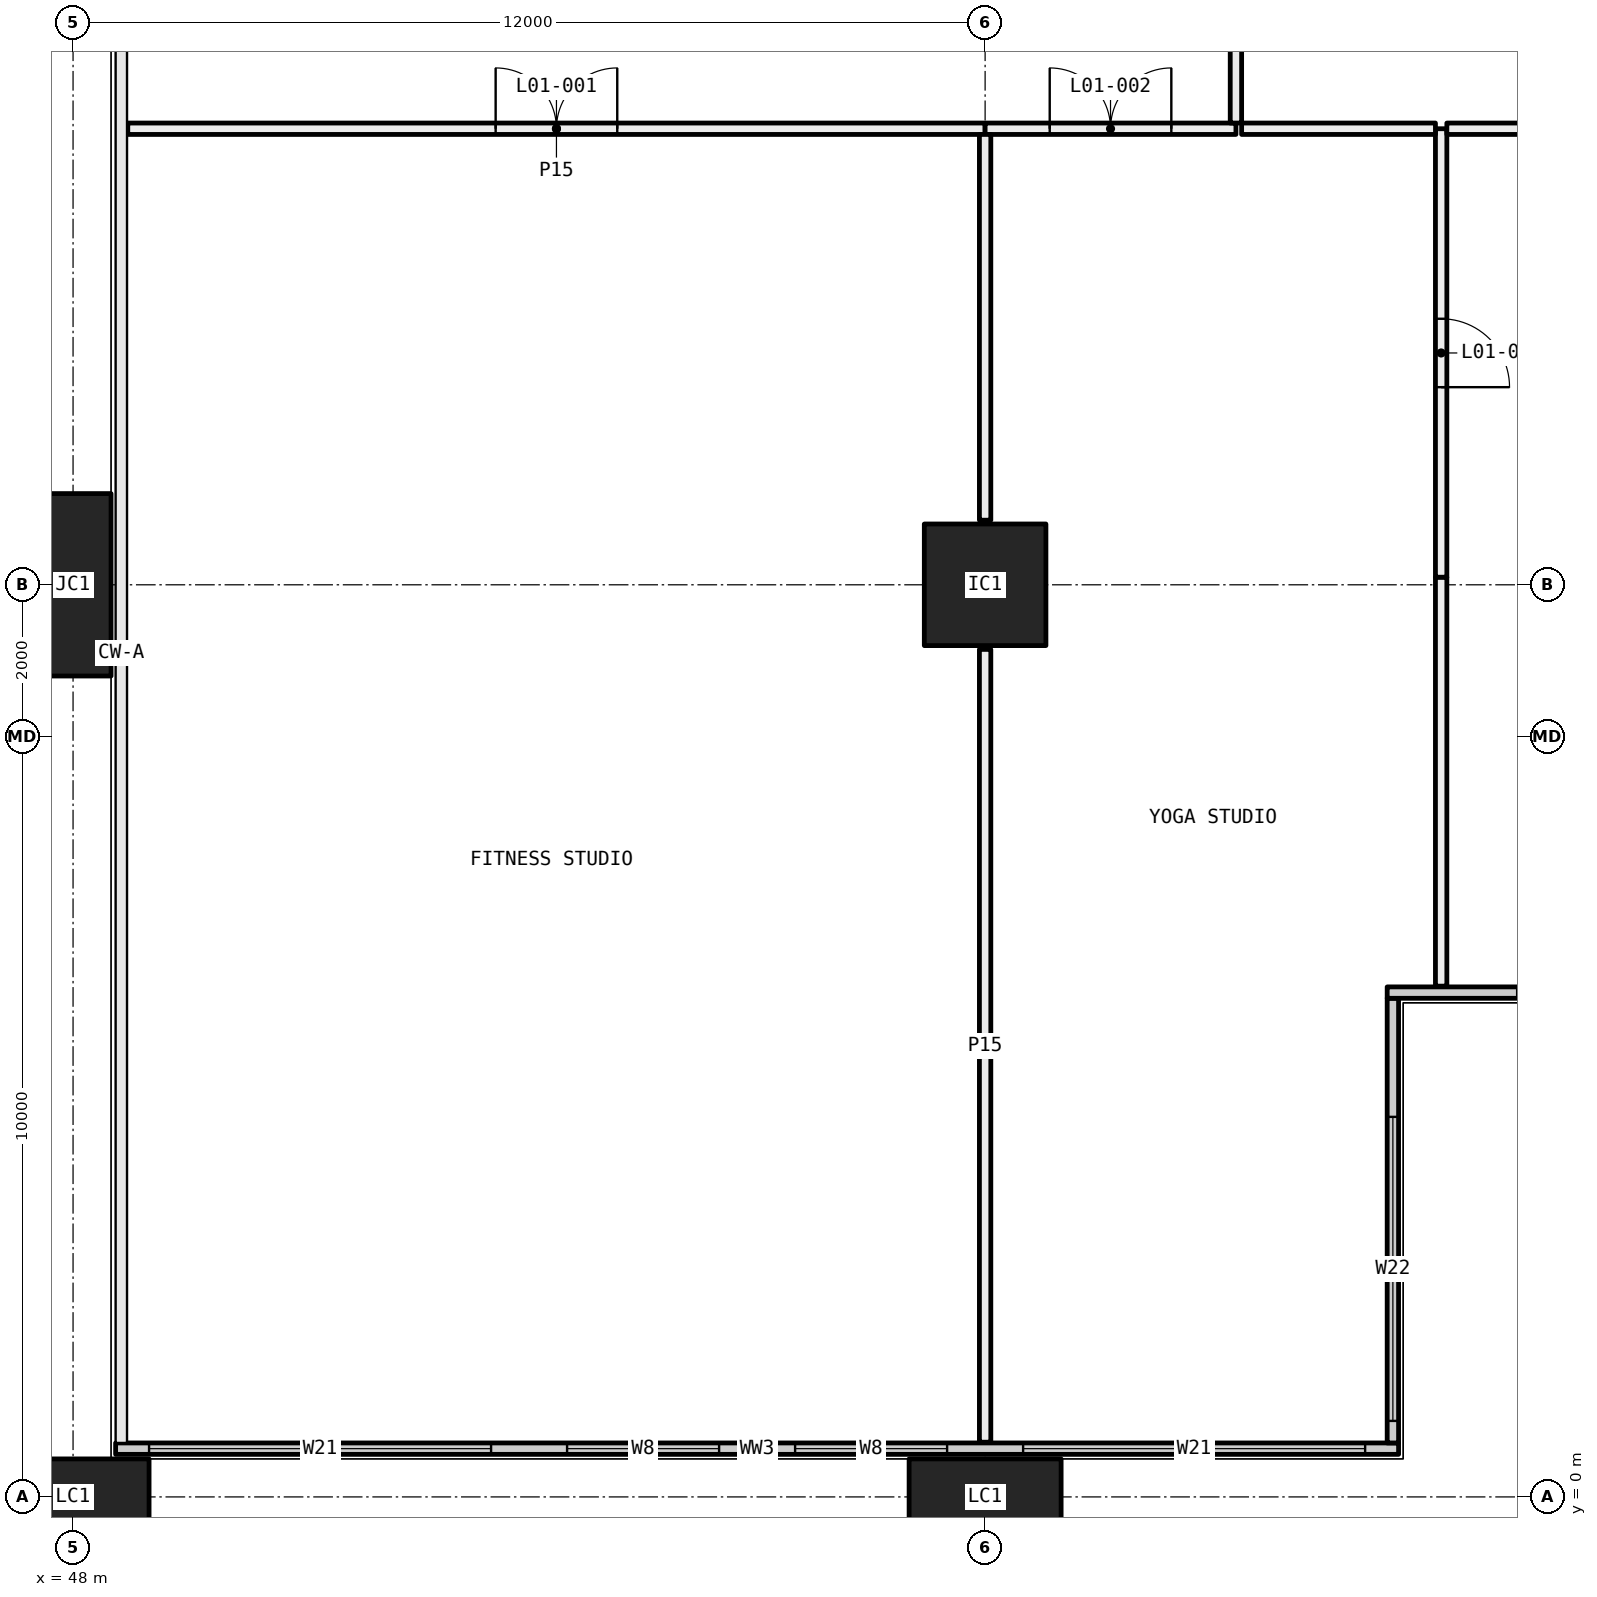
"""IFC4 building model, lengths in metres.
Left out: names, types, materials, properties, quantities, classifications, styles, units other than length and angle.
Written with IfcOpenShell. Run it as: python <this file> out.ifc"""

import sys

from ifc_helpers import new_model, si_unit, direction, frame, frame_2d, origin, origin_2d, place, context, subcontext, project, spatial, rectangle, hollow_rectangle, extrude, element, fill, save


model = new_model("IFC4")
c1 = context("Model", 3, precision=1e-05, world=origin(), true_north=direction((0.0, 1.0)))
c2 = subcontext(c1, "Body", "Model", "MODEL_VIEW")
j1 = project(units=[si_unit("LENGTHUNIT", "METRE"), si_unit("PLANEANGLEUNIT", "RADIAN")], contexts=[c1])
p1 = place(None, origin())
s1 = spatial("IfcSite", under=j1, at=p1, CompositionType="ELEMENT")
p2 = place(p1, origin())
s2 = spatial("IfcBuilding", under=s1, at=p2, CompositionType="ELEMENT")
p3 = place(p2, frame((0.0, 0.0, 6.0)))
s3 = spatial("IfcBuildingStorey", under=s2, at=p3, CompositionType="ELEMENT", Elevation=6.0)
p4 = place(p3, frame((48.0, 0.0, -0.4), z_axis=(0.0, 0.0, 1.0), x_axis=(1.0, 0.0, 0.0)))
e1 = element("IfcColumn", 1, at=p4, inside=s3, PredefinedType="COLUMN", context=c2, shape_type="SweptSolid", body=[
    extrude(hollow_rectangle(XDim=2.0, YDim=1.0, WallThickness=0.08, at=origin_2d()), origin(), (0.0, 0.0, 1.0), 6.0),
])
p5 = place(p3, frame((48.0, 12.0, -0.4), z_axis=(0.0, 0.0, 1.0), x_axis=(0.0, 1.0, 0.0)))
e2 = element("IfcColumn", 2, at=p5, inside=s3, PredefinedType="COLUMN", context=c2, shape_type="SweptSolid", body=[
    extrude(hollow_rectangle(XDim=2.4, YDim=1.0, WallThickness=0.09, at=origin_2d()), origin(), (0.0, 0.0, 1.0), 6.0),
])
p6 = place(p3, frame((60.0, 0.0, -0.4), z_axis=(0.0, 0.0, 1.0), x_axis=(1.0, 0.0, 0.0)))
e3 = element("IfcColumn", 3, at=p6, inside=s3, PredefinedType="COLUMN", context=c2, shape_type="SweptSolid", body=[
    extrude(hollow_rectangle(XDim=2.0, YDim=1.0, WallThickness=0.08, at=origin_2d()), origin(), (0.0, 0.0, 1.0), 6.0),
])
p7 = place(p3, frame((60.0, 12.0, 0.0), z_axis=(0.0, 0.0, 1.0), x_axis=(1.0, 0.0, 0.0)))
e4 = element("IfcColumn", 4, at=p7, inside=s3, PredefinedType="COLUMN", context=c2, shape_type="SweptSolid", body=[
    extrude(hollow_rectangle(XDim=1.6, YDim=1.6, WallThickness=0.07, at=origin_2d()), origin(), (0.0, 0.0, 1.0), 5.6),
])
p8 = place(p3, frame((48.56, 0.635, 0.0), z_axis=(0.0, 0.0, 1.0), x_axis=(1.0, 0.0, 0.0)))
e5 = element("IfcWall", 5, at=p8, inside=s3, PredefinedType="ELEMENTEDWALL", context=c2, shape_type="SweptSolid", body=[
    extrude(rectangle(XDim=16.88, YDim=0.15, at=frame_2d((8.44, 0.0))), origin(), (0.0, 0.0, 1.0), 5.6),
])
p9 = place(p8, frame((0.44, 0.0, 0.45)))
e6 = element("IfcOpeningElement", 6, at=p9, cuts=e5, PredefinedType="OPENING", context=c2, shape_type="SweptSolid", body=[
    extrude(rectangle(XDim=4.5, YDim=5.1, at=frame_2d((2.25, 2.55))), frame((0.0, 0.085, 0.0), z_axis=(0.0, -1.0, 0.0), x_axis=(1.0, 0.0, 0.0)), (0.0, 0.0, 1.0), 0.17),
])
p10 = place(p8, frame((5.94, 0.0, 0.45)))
e7 = element("IfcOpeningElement", 7, at=p10, cuts=e5, PredefinedType="OPENING", context=c2, shape_type="SweptSolid", body=[
    extrude(rectangle(XDim=2.0, YDim=5.1, at=frame_2d((1.0, 2.55))), frame((0.0, 0.085, 0.0), z_axis=(0.0, -1.0, 0.0), x_axis=(1.0, 0.0, 0.0)), (0.0, 0.0, 1.0), 0.17),
])
p11 = place(p8, frame((8.94, 0.0, 0.45)))
e8 = element("IfcOpeningElement", 8, at=p11, cuts=e5, PredefinedType="OPENING", context=c2, shape_type="SweptSolid", body=[
    extrude(rectangle(XDim=2.0, YDim=5.1, at=frame_2d((1.0, 2.55))), frame((0.0, 0.085, 0.0), z_axis=(0.0, -1.0, 0.0), x_axis=(1.0, 0.0, 0.0)), (0.0, 0.0, 1.0), 0.17),
])
p12 = place(p8, frame((11.94, 0.0, 0.45)))
e9 = element("IfcOpeningElement", 9, at=p12, cuts=e5, PredefinedType="OPENING", context=c2, shape_type="SweptSolid", body=[
    extrude(rectangle(XDim=4.5, YDim=5.1, at=frame_2d((2.25, 2.55))), frame((0.0, 0.085, 0.0), z_axis=(0.0, -1.0, 0.0), x_axis=(1.0, 0.0, 0.0)), (0.0, 0.0, 1.0), 0.17),
])
p13 = place(p3, frame((65.365, 0.71, 0.0), z_axis=(0.0, 0.0, 1.0), x_axis=(0.0, 1.0, 0.0)))
e10 = element("IfcWall", 10, at=p13, inside=s3, PredefinedType="ELEMENTEDWALL", context=c2, shape_type="SweptSolid", body=[
    extrude(rectangle(XDim=5.85, YDim=0.15, at=frame_2d((2.925, 0.0))), origin(), (0.0, 0.0, 1.0), 5.6),
])
p14 = place(p13, frame((0.29, 0.0, 0.45)))
e11 = element("IfcOpeningElement", 11, at=p14, cuts=e10, PredefinedType="OPENING", context=c2, shape_type="SweptSolid", body=[
    extrude(rectangle(XDim=4.0, YDim=5.1, at=frame_2d((2.0, 2.55))), frame((0.0, 0.085, 0.0), z_axis=(0.0, -1.0, 0.0), x_axis=(1.0, 0.0, 0.0)), (0.0, 0.0, 1.0), 0.17),
])
p15 = place(p3, frame((65.29, 6.635, 0.0), z_axis=(0.0, 0.0, 1.0), x_axis=(1.0, 0.0, 0.0)))
e12 = element("IfcWall", 12, at=p15, inside=s3, PredefinedType="ELEMENTEDWALL", context=c2, shape_type="SweptSolid", body=[
    extrude(rectangle(XDim=6.15, YDim=0.15, at=frame_2d((3.075, 0.0))), origin(), (0.0, 0.0, 1.0), 5.6),
])
p16 = place(p15, frame((1.71, 0.0, 0.45)))
e13 = element("IfcOpeningElement", 13, at=p16, cuts=e12, PredefinedType="OPENING", context=c2, shape_type="SweptSolid", body=[
    extrude(rectangle(XDim=4.0, YDim=5.1, at=frame_2d((2.0, 2.55))), frame((0.0, 0.085, 0.0), z_axis=(0.0, -1.0, 0.0), x_axis=(1.0, 0.0, 0.0)), (0.0, 0.0, 1.0), 0.17),
])
p17 = place(p3, frame((48.72, 18.0, 0.0), z_axis=(0.0, 0.0, 1.0), x_axis=(1.0, 0.0, 0.0)))
e14 = element("IfcWall", 14, at=p17, inside=s3, PredefinedType="PARTITIONING", context=c2, shape_type="SweptSolid", body=[
    extrude(rectangle(XDim=11.28, YDim=0.15, at=frame_2d((5.64, 0.0))), origin(), (0.0, 0.0, 1.0), 5.6),
])
p18 = place(p17, frame((4.84, 0.0, 0.0)))
e15 = element("IfcOpeningElement", 15, at=p18, cuts=e14, PredefinedType="OPENING", context=c2, shape_type="SweptSolid", body=[
    extrude(rectangle(XDim=1.6, YDim=2.1, at=frame_2d((0.8, 1.05))), frame((0.0, 0.085, 0.0), z_axis=(0.0, -1.0, 0.0), x_axis=(1.0, 0.0, 0.0)), (0.0, 0.0, 1.0), 0.17),
])
p19 = place(p3, frame((60.0, 18.0, 0.0), z_axis=(0.0, 0.0, 1.0), x_axis=(1.0, 0.0, 0.0)))
e16 = element("IfcWall", 16, at=p19, inside=s3, PredefinedType="PARTITIONING", context=c2, shape_type="SweptSolid", body=[
    extrude(rectangle(XDim=3.3, YDim=0.15, at=frame_2d((1.65, 0.0))), origin(), (0.0, 0.0, 1.0), 5.6),
])
p20 = place(p19, frame((0.85, 0.0, 0.0)))
e17 = element("IfcOpeningElement", 17, at=p20, cuts=e16, PredefinedType="OPENING", context=c2, shape_type="SweptSolid", body=[
    extrude(rectangle(XDim=1.6, YDim=2.1, at=frame_2d((0.8, 1.05))), frame((0.0, 0.085, 0.0), z_axis=(0.0, -1.0, 0.0), x_axis=(1.0, 0.0, 0.0)), (0.0, 0.0, 1.0), 0.17),
])
p21 = place(p3, frame((63.3, 18.075, 0.0), z_axis=(0.0, 0.0, 1.0), x_axis=(0.0, 1.0, 0.0)))
e18 = element("IfcWall", 18, at=p21, inside=s3, PredefinedType="PARTITIONING", context=c2, shape_type="SweptSolid", body=[
    extrude(rectangle(XDim=5.925, YDim=0.15, at=frame_2d((2.962, 0.0))), origin(), (0.0, 0.0, 1.0), 5.0),
])
p22 = place(p21, frame((2.512, 0.0, 0.0)))
e19 = element("IfcOpeningElement", 19, at=p22, cuts=e18, PredefinedType="OPENING", context=c2, shape_type="SweptSolid", body=[
    extrude(rectangle(XDim=0.9, YDim=2.1, at=frame_2d((0.45, 1.05))), frame((0.0, 0.085, 0.0), z_axis=(0.0, -1.0, 0.0), x_axis=(1.0, 0.0, 0.0)), (0.0, 0.0, 1.0), 0.17),
])
p23 = place(p3, frame((60.0, 0.72, 0.0), z_axis=(0.0, 0.0, 1.0), x_axis=(0.0, 1.0, 0.0)))
e20 = element("IfcWall", 20, at=p23, inside=s3, PredefinedType="PARTITIONING", context=c2, shape_type="SweptSolid", body=[
    extrude(rectangle(XDim=10.43, YDim=0.15, at=frame_2d((5.215, 0.0))), origin(), (0.0, 0.0, 1.0), 5.0),
])
p24 = place(p3, frame((60.0, 12.85, 0.0), z_axis=(0.0, 0.0, 1.0), x_axis=(0.0, 1.0, 0.0)))
e21 = element("IfcWall", 21, at=p24, inside=s3, PredefinedType="PARTITIONING", context=c2, shape_type="SweptSolid", body=[
    extrude(rectangle(XDim=5.075, YDim=0.15, at=frame_2d((2.538, 0.0))), origin(), (0.0, 0.0, 1.0), 5.6),
])
p25 = place(p3, frame((66.0, 6.72, 0.0), z_axis=(0.0, 0.0, 1.0), x_axis=(0.0, 1.0, 0.0)))
e22 = element("IfcWall", 22, at=p25, inside=s3, PredefinedType="PARTITIONING", context=c2, shape_type="SweptSolid", body=[
    extrude(rectangle(XDim=5.38, YDim=0.15, at=frame_2d((2.69, 0.0))), origin(), (0.0, 0.0, 1.0), 5.0),
])
p26 = place(p3, frame((66.0, 12.1, 0.0), z_axis=(0.0, 0.0, 1.0), x_axis=(0.0, 1.0, 0.0)))
e23 = element("IfcWall", 23, at=p26, inside=s3, PredefinedType="PARTITIONING", context=c2, shape_type="SweptSolid", body=[
    extrude(rectangle(XDim=5.9, YDim=0.15, at=frame_2d((2.95, 0.0))), origin(), (0.0, 0.0, 1.0), 5.6),
])
p27 = place(p26, frame((2.5, 0.0, 0.0)))
e24 = element("IfcOpeningElement", 24, at=p27, cuts=e23, PredefinedType="OPENING", context=c2, shape_type="SweptSolid", body=[
    extrude(rectangle(XDim=0.9, YDim=2.1, at=frame_2d((0.45, 1.05))), frame((0.0, 0.085, 0.0), z_axis=(0.0, -1.0, 0.0), x_axis=(1.0, 0.0, 0.0)), (0.0, 0.0, 1.0), 0.17),
])
p28 = place(p3, frame((65.925, 18.0, 0.0), z_axis=(0.0, 0.0, 1.0), x_axis=(-1.0, 0.0, 0.0)))
e25 = element("IfcWall", 25, at=p28, inside=s3, PredefinedType="PARTITIONING", context=c2, shape_type="SweptSolid", body=[
    extrude(rectangle(XDim=2.55, YDim=0.15, at=frame_2d((1.275, 0.0))), origin(), (0.0, 0.0, 1.0), 5.6),
])
p29 = place(p3, frame((71.28, 18.0, 0.0), z_axis=(0.0, 0.0, 1.0), x_axis=(-1.0, 0.0, 0.0)))
e26 = element("IfcWall", 26, at=p29, inside=s3, PredefinedType="PARTITIONING", context=c2, shape_type="SweptSolid", body=[
    extrude(rectangle(XDim=5.205, YDim=0.15, at=frame_2d((2.603, 0.0))), origin(), (0.0, 0.0, 1.0), 5.6),
])
p30 = place(p9, origin())
e27 = element("IfcWindow", 27, at=p30, inside=s3, PartitioningType="SINGLE_PANEL", PredefinedType="WINDOW", context=c2, shape_type="SweptSolid", body=[
    extrude(rectangle(XDim=4.5, YDim=5.1, at=frame_2d((2.25, 2.55))), frame((0.0, 0.03, 0.0), z_axis=(0.0, -1.0, 0.0), x_axis=(1.0, 0.0, 0.0)), (0.0, 0.0, 1.0), 0.06),
])
fill(e6, e27)
p31 = place(p10, origin())
e28 = element("IfcWindow", 28, at=p31, inside=s3, PartitioningType="SINGLE_PANEL", PredefinedType="WINDOW", context=c2, shape_type="SweptSolid", body=[
    extrude(rectangle(XDim=2.0, YDim=5.1, at=frame_2d((1.0, 2.55))), frame((0.0, 0.03, 0.0), z_axis=(0.0, -1.0, 0.0), x_axis=(1.0, 0.0, 0.0)), (0.0, 0.0, 1.0), 0.06),
])
fill(e7, e28)
p32 = place(p11, origin())
e29 = element("IfcWindow", 29, at=p32, inside=s3, PartitioningType="SINGLE_PANEL", PredefinedType="WINDOW", context=c2, shape_type="SweptSolid", body=[
    extrude(rectangle(XDim=2.0, YDim=5.1, at=frame_2d((1.0, 2.55))), frame((0.0, 0.03, 0.0), z_axis=(0.0, -1.0, 0.0), x_axis=(1.0, 0.0, 0.0)), (0.0, 0.0, 1.0), 0.06),
])
fill(e8, e29)
p33 = place(p12, origin())
e30 = element("IfcWindow", 30, at=p33, inside=s3, PartitioningType="SINGLE_PANEL", PredefinedType="WINDOW", context=c2, shape_type="SweptSolid", body=[
    extrude(rectangle(XDim=4.5, YDim=5.1, at=frame_2d((2.25, 2.55))), frame((0.0, 0.03, 0.0), z_axis=(0.0, -1.0, 0.0), x_axis=(1.0, 0.0, 0.0)), (0.0, 0.0, 1.0), 0.06),
])
fill(e9, e30)
p34 = place(p14, origin())
e31 = element("IfcWindow", 31, at=p34, inside=s3, PartitioningType="SINGLE_PANEL", PredefinedType="WINDOW", context=c2, shape_type="SweptSolid", body=[
    extrude(rectangle(XDim=4.0, YDim=5.1, at=frame_2d((2.0, 2.55))), frame((0.0, 0.03, 0.0), z_axis=(0.0, -1.0, 0.0), x_axis=(1.0, 0.0, 0.0)), (0.0, 0.0, 1.0), 0.06),
])
fill(e11, e31)
p35 = place(p18, origin())
e32 = element("IfcDoor", 32, at=p35, inside=s3, OperationType="DOUBLE_DOOR_SINGLE_SWING", PredefinedType="DOOR", context=c2, shape_type="SweptSolid", body=[
    extrude(rectangle(XDim=1.6, YDim=2.1, at=frame_2d((0.8, 1.05))), frame((0.0, 0.025, 0.0), z_axis=(0.0, -1.0, 0.0), x_axis=(1.0, 0.0, 0.0)), (0.0, 0.0, 1.0), 0.05),
])
fill(e15, e32)
p36 = place(p20, origin())
e33 = element("IfcDoor", 33, at=p36, inside=s3, OperationType="DOUBLE_DOOR_SINGLE_SWING", PredefinedType="DOOR", context=c2, shape_type="SweptSolid", body=[
    extrude(rectangle(XDim=1.6, YDim=2.1, at=frame_2d((0.8, 1.05))), frame((0.0, 0.025, 0.0), z_axis=(0.0, -1.0, 0.0), x_axis=(1.0, 0.0, 0.0)), (0.0, 0.0, 1.0), 0.05),
])
fill(e17, e33)
p37 = place(p27, frame((0.9, 0.0, 0.0), x_axis=(-1.0, 0.0, 0.0)))
e34 = element("IfcDoor", 34, at=p37, inside=s3, OperationType="SINGLE_SWING_LEFT", PredefinedType="DOOR", context=c2, shape_type="SweptSolid", body=[
    extrude(rectangle(XDim=0.9, YDim=2.1, at=frame_2d((0.45, 1.05))), frame((0.0, 0.025, 0.0), z_axis=(0.0, -1.0, 0.0), x_axis=(1.0, 0.0, 0.0)), (0.0, 0.0, 1.0), 0.05),
])
fill(e24, e34)
save(model, sys.argv[1])
